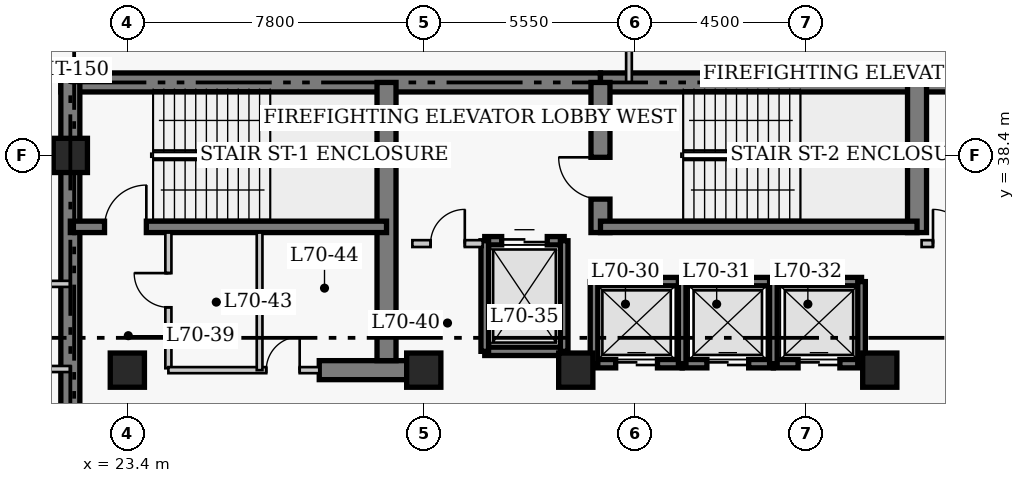
"""IFC4 building model, lengths in metres.
Left out: names, types, materials, properties, quantities, classifications, styles, units other than length and angle.
Written with IfcOpenShell. Run it as: python <this file> out.ifc"""

import sys

from ifc_helpers import new_model, si_unit, direction, frame, frame_2d, origin, origin_2d, place, context, subcontext, project, spatial, rectangle, extrude, element, fill, save


model = new_model("IFC4")
c1 = context("Model", 3, precision=1e-05, world=origin(), true_north=direction((0.0, 1.0)))
c2 = subcontext(c1, "Body", "Model", "MODEL_VIEW")
j1 = project(units=[si_unit("LENGTHUNIT", "METRE"), si_unit("PLANEANGLEUNIT", "RADIAN")], contexts=[c1])
p1 = place(None, origin())
s1 = spatial("IfcSite", under=j1, at=p1, CompositionType="ELEMENT")
p2 = place(p1, origin())
s2 = spatial("IfcBuilding", under=s1, at=p2, CompositionType="ELEMENT")
p3 = place(p2, frame((0.0, 0.0, 281.4)))
s3 = spatial("IfcBuildingStorey", under=s2, at=p3, CompositionType="ELEMENT", Elevation=281.4)
p4 = place(p3, frame((21.65, 40.32, 0.0), z_axis=(0.0, 0.0, 1.0), x_axis=(1.0, 0.0, 0.0)))
e1 = element("IfcWall", 1, at=p4, inside=s3, PredefinedType="SHEAR", context=c2, shape_type="SweptSolid", body=[
    extrude(rectangle(XDim=14.2, YDim=0.5, at=frame_2d((7.1, 0.0))), origin(), (0.0, 0.0, 1.0), 4.0),
])
p5 = place(p3, frame((35.85, 40.32, 0.0), z_axis=(0.0, 0.0, 1.0), x_axis=(1.0, 0.0, 0.0)))
e2 = element("IfcWall", 2, at=p5, inside=s3, PredefinedType="SHEAR", context=c2, shape_type="SweptSolid", body=[
    extrude(rectangle(XDim=12.6, YDim=0.5, at=frame_2d((6.3, 0.0))), origin(), (0.0, 0.0, 1.0), 4.0),
])
p6 = place(p3, frame((21.9, 27.05, 0.0), z_axis=(0.0, 0.0, 1.0), x_axis=(0.0, 1.0, 0.0)))
e3 = element("IfcWall", 3, at=p6, inside=s3, PredefinedType="SHEAR", context=c2, shape_type="SweptSolid", body=[
    extrude(rectangle(XDim=13.52, YDim=0.5, at=frame_2d((6.76, 0.0))), origin(), (0.0, 0.0, 1.0), 4.0),
])
p7 = place(p3, frame((28.45, 32.75, 0.0), z_axis=(0.0, 0.0, 1.0), x_axis=(1.0, 0.0, 0.0)))
e4 = element("IfcWall", 4, at=p7, inside=s3, PredefinedType="SHEAR", context=c2, shape_type="SweptSolid", body=[
    extrude(rectangle(XDim=2.4, YDim=0.5, at=frame_2d((1.2, 0.0))), origin(), (0.0, 0.0, 1.0), 4.0),
])
p8 = place(p3, frame((30.22, 33.0, 0.0), z_axis=(0.0, 0.0, 1.0), x_axis=(0.0, 1.0, 0.0)))
e5 = element("IfcWall", 5, at=p8, inside=s3, PredefinedType="SHEAR", context=c2, shape_type="SweptSolid", body=[
    extrude(rectangle(XDim=7.32, YDim=0.5, at=frame_2d((3.66, 0.0))), origin(), (0.0, 0.0, 1.0), 4.0),
])
p9 = place(p3, frame((35.85, 36.37, 0.0), z_axis=(0.0, 0.0, 1.0), x_axis=(0.0, 1.0, 0.0)))
e6 = element("IfcWall", 6, at=p9, inside=s3, PredefinedType="SHEAR", context=c2, shape_type="SweptSolid", body=[
    extrude(rectangle(XDim=3.95, YDim=0.5, at=frame_2d((1.975, 0.0))), origin(), (0.0, 0.0, 1.0), 4.0),
])
p10 = place(p9, frame((0.88, 0.0, 0.0)))
e7 = element("IfcOpeningElement", 7, at=p10, cuts=e6, PredefinedType="OPENING", context=c2, shape_type="SweptSolid", body=[
    extrude(rectangle(XDim=1.1, YDim=2.15, at=frame_2d((0.55, 1.075))), frame((0.0, 0.26, 0.0), z_axis=(0.0, -1.0, 0.0), x_axis=(1.0, 0.0, 0.0)), (0.0, 0.0, 1.0), 0.52),
])
p11 = place(p3, frame((44.18, 36.37, 0.0), z_axis=(0.0, 0.0, 1.0), x_axis=(0.0, 1.0, 0.0)))
e8 = element("IfcWall", 8, at=p11, inside=s3, PredefinedType="SHEAR", context=c2, shape_type="SweptSolid", body=[
    extrude(rectangle(XDim=3.95, YDim=0.5, at=frame_2d((1.975, 0.0))), origin(), (0.0, 0.0, 1.0), 4.0),
])
p12 = place(p3, frame((21.9, 36.52, 0.0), z_axis=(0.0, 0.0, 1.0), x_axis=(1.0, 0.0, 0.0)))
e9 = element("IfcWall", 9, at=p12, inside=s3, PredefinedType="SHEAR", context=c2, shape_type="SweptSolid", body=[
    extrude(rectangle(XDim=8.32, YDim=0.3, at=frame_2d((4.16, 0.0))), origin(), (0.0, 0.0, 1.0), 4.0),
])
p13 = place(p12, frame((0.9, 0.0, 0.0)))
e10 = element("IfcOpeningElement", 10, at=p13, cuts=e9, PredefinedType="OPENING", context=c2, shape_type="SweptSolid", body=[
    extrude(rectangle(XDim=1.1, YDim=2.15, at=frame_2d((0.55, 1.075))), frame((0.0, 0.16, 0.0), z_axis=(0.0, -1.0, 0.0), x_axis=(1.0, 0.0, 0.0)), (0.0, 0.0, 1.0), 0.32),
])
p14 = place(p3, frame((35.85, 36.52, 0.0), z_axis=(0.0, 0.0, 1.0), x_axis=(1.0, 0.0, 0.0)))
e11 = element("IfcWall", 11, at=p14, inside=s3, PredefinedType="SHEAR", context=c2, shape_type="SweptSolid", body=[
    extrude(rectangle(XDim=8.33, YDim=0.3, at=frame_2d((4.165, 0.0))), origin(), (0.0, 0.0, 1.0), 4.0),
])
for number, where, z_axis, x_axis in (
    (12, (21.9, 38.4, 0.0), (0.0, 0.0, 1.0), (1.0, 0.0, 0.0)),
    (13, (23.4, 32.75, 0.0), (0.0, 0.0, 1.0), (1.0, 0.0, 0.0)),
    (14, (31.2, 32.75, 0.0), (0.0, 0.0, 1.0), (1.0, 0.0, 0.0)),
    (15, (35.2, 32.75, 0.0), (0.0, 0.0, 1.0), (1.0, 0.0, 0.0)),
    (16, (43.2, 32.75, 0.0), (0.0, 0.0, 1.0), (1.0, 0.0, 0.0)),
):
    element("IfcColumn", number, at=place(p3, frame(where, z_axis=z_axis, x_axis=x_axis)), inside=s3, PredefinedType="COLUMN", context=c2, shape_type="SweptSolid", body=[
        extrude(rectangle(XDim=0.9, YDim=0.9, at=origin_2d()), origin(), (0.0, 0.0, 1.0), 4.0),
    ])
p15 = place(p3, frame((35.68, 35.08, 0.0), z_axis=(0.0, 0.0, 1.0), x_axis=(1.0, 0.0, 0.0)))
e17 = element("IfcWall", 17, at=p15, inside=s3, PredefinedType="SHEAR", context=c2, shape_type="SweptSolid", body=[
    extrude(rectangle(XDim=2.32, YDim=0.22, at=frame_2d((1.16, 0.0))), origin(), (0.0, 0.0, 1.0), 4.0),
])
p16 = place(p3, frame((35.68, 32.92, 0.0), z_axis=(0.0, 0.0, 1.0), x_axis=(1.0, 0.0, 0.0)))
e18 = element("IfcWall", 18, at=p16, inside=s3, PredefinedType="SHEAR", context=c2, shape_type="SweptSolid", body=[
    extrude(rectangle(XDim=2.32, YDim=0.22, at=frame_2d((1.16, 0.0))), origin(), (0.0, 0.0, 1.0), 4.0),
])
p17 = place(p16, frame((0.57, 0.0, 0.0)))
e19 = element("IfcOpeningElement", 19, at=p17, cuts=e18, PredefinedType="OPENING", context=c2, shape_type="SweptSolid", body=[
    extrude(rectangle(XDim=1.1, YDim=2.15, at=frame_2d((0.55, 1.075))), frame((0.0, 0.12, 0.0), z_axis=(0.0, -1.0, 0.0), x_axis=(1.0, 0.0, 0.0)), (0.0, 0.0, 1.0), 0.24),
])
p18 = place(p3, frame((35.68, 32.92, 0.0), z_axis=(0.0, 0.0, 1.0), x_axis=(0.0, 1.0, 0.0)))
e20 = element("IfcWall", 20, at=p18, inside=s3, PredefinedType="SHEAR", context=c2, shape_type="SweptSolid", body=[
    extrude(rectangle(XDim=2.16, YDim=0.2, at=frame_2d((1.08, 0.0))), origin(), (0.0, 0.0, 1.0), 4.0),
])
p19 = place(p3, frame((38.0, 35.08, 0.0), z_axis=(0.0, 0.0, 1.0), x_axis=(1.0, 0.0, 0.0)))
e21 = element("IfcWall", 21, at=p19, inside=s3, PredefinedType="SHEAR", context=c2, shape_type="SweptSolid", body=[
    extrude(rectangle(XDim=2.4, YDim=0.22, at=frame_2d((1.2, 0.0))), origin(), (0.0, 0.0, 1.0), 4.0),
])
p20 = place(p3, frame((38.0, 32.92, 0.0), z_axis=(0.0, 0.0, 1.0), x_axis=(1.0, 0.0, 0.0)))
e22 = element("IfcWall", 22, at=p20, inside=s3, PredefinedType="SHEAR", context=c2, shape_type="SweptSolid", body=[
    extrude(rectangle(XDim=2.4, YDim=0.22, at=frame_2d((1.2, 0.0))), origin(), (0.0, 0.0, 1.0), 4.0),
])
p21 = place(p20, frame((0.65, 0.0, 0.0)))
e23 = element("IfcOpeningElement", 23, at=p21, cuts=e22, PredefinedType="OPENING", context=c2, shape_type="SweptSolid", body=[
    extrude(rectangle(XDim=1.1, YDim=2.15, at=frame_2d((0.55, 1.075))), frame((0.0, 0.12, 0.0), z_axis=(0.0, -1.0, 0.0), x_axis=(1.0, 0.0, 0.0)), (0.0, 0.0, 1.0), 0.24),
])
p22 = place(p3, frame((38.0, 32.92, 0.0), z_axis=(0.0, 0.0, 1.0), x_axis=(0.0, 1.0, 0.0)))
e24 = element("IfcWall", 24, at=p22, inside=s3, PredefinedType="SHEAR", context=c2, shape_type="SweptSolid", body=[
    extrude(rectangle(XDim=2.16, YDim=0.2, at=frame_2d((1.08, 0.0))), origin(), (0.0, 0.0, 1.0), 4.0),
])
p23 = place(p3, frame((40.4, 35.08, 0.0), z_axis=(0.0, 0.0, 1.0), x_axis=(1.0, 0.0, 0.0)))
e25 = element("IfcWall", 25, at=p23, inside=s3, PredefinedType="SHEAR", context=c2, shape_type="SweptSolid", body=[
    extrude(rectangle(XDim=2.32, YDim=0.22, at=frame_2d((1.16, 0.0))), origin(), (0.0, 0.0, 1.0), 4.0),
])
p24 = place(p3, frame((40.4, 32.92, 0.0), z_axis=(0.0, 0.0, 1.0), x_axis=(1.0, 0.0, 0.0)))
e26 = element("IfcWall", 26, at=p24, inside=s3, PredefinedType="SHEAR", context=c2, shape_type="SweptSolid", body=[
    extrude(rectangle(XDim=2.32, YDim=0.22, at=frame_2d((1.16, 0.0))), origin(), (0.0, 0.0, 1.0), 4.0),
])
p25 = place(p24, frame((0.65, 0.0, 0.0)))
e27 = element("IfcOpeningElement", 27, at=p25, cuts=e26, PredefinedType="OPENING", context=c2, shape_type="SweptSolid", body=[
    extrude(rectangle(XDim=1.1, YDim=2.15, at=frame_2d((0.55, 1.075))), frame((0.0, 0.12, 0.0), z_axis=(0.0, -1.0, 0.0), x_axis=(1.0, 0.0, 0.0)), (0.0, 0.0, 1.0), 0.24),
])
for number, where, z_axis, x_axis in (
    (28, (40.4, 32.92, 0.0), (0.0, 0.0, 1.0), (0.0, 1.0, 0.0)),
    (29, (42.72, 32.92, 0.0), (0.0, 0.0, 1.0), (0.0, 1.0, 0.0)),
):
    element("IfcWall", number, at=place(p3, frame(where, z_axis=z_axis, x_axis=x_axis)), inside=s3, PredefinedType="SHEAR", context=c2, shape_type="SweptSolid", body=[
        extrude(rectangle(XDim=2.16, YDim=0.2, at=frame_2d((1.08, 0.0))), origin(), (0.0, 0.0, 1.0), 4.0),
    ])
p26 = place(p3, frame((32.805, 36.155, 0.0), z_axis=(0.0, 0.0, 1.0), x_axis=(1.0, 0.0, 0.0)))
e30 = element("IfcWall", 30, at=p26, inside=s3, PredefinedType="SHEAR", context=c2, shape_type="SweptSolid", body=[
    extrude(rectangle(XDim=2.09, YDim=0.22, at=frame_2d((1.045, 0.0))), origin(), (0.0, 0.0, 1.0), 4.0),
])
p27 = place(p26, frame((0.445, 0.0, 0.0)))
e31 = element("IfcOpeningElement", 31, at=p27, cuts=e30, PredefinedType="OPENING", context=c2, shape_type="SweptSolid", body=[
    extrude(rectangle(XDim=1.2, YDim=2.15, at=frame_2d((0.6, 1.075))), frame((0.0, 0.12, 0.0), z_axis=(0.0, -1.0, 0.0), x_axis=(1.0, 0.0, 0.0)), (0.0, 0.0, 1.0), 0.24),
])
p28 = place(p3, frame((32.805, 33.245, 0.0), z_axis=(0.0, 0.0, 1.0), x_axis=(1.0, 0.0, 0.0)))
e32 = element("IfcWall", 32, at=p28, inside=s3, PredefinedType="SHEAR", context=c2, shape_type="SweptSolid", body=[
    extrude(rectangle(XDim=2.09, YDim=0.22, at=frame_2d((1.045, 0.0))), origin(), (0.0, 0.0, 1.0), 4.0),
])
for number, where, z_axis, x_axis in (
    (33, (32.805, 33.245, 0.0), (0.0, 0.0, 1.0), (0.0, 1.0, 0.0)),
    (34, (34.895, 33.245, 0.0), (0.0, 0.0, 1.0), (0.0, 1.0, 0.0)),
):
    element("IfcWall", number, at=place(p3, frame(where, z_axis=z_axis, x_axis=x_axis)), inside=s3, PredefinedType="SHEAR", context=c2, shape_type="SweptSolid", body=[
        extrude(rectangle(XDim=2.91, YDim=0.2, at=frame_2d((1.455, 0.0))), origin(), (0.0, 0.0, 1.0), 4.0),
    ])
p29 = place(p3, frame((30.9, 36.08, 0.0), z_axis=(0.0, 0.0, 1.0), x_axis=(1.0, 0.0, 0.0)))
e35 = element("IfcWall", 35, at=p29, inside=s3, PredefinedType="PARTITIONING", context=c2, shape_type="SweptSolid", body=[
    extrude(rectangle(XDim=1.85, YDim=0.18, at=frame_2d((0.925, 0.0))), origin(), (0.0, 0.0, 1.0), 3.76),
])
p30 = place(p29, frame((0.48, 0.0, 0.0)))
e36 = element("IfcOpeningElement", 36, at=p30, cuts=e35, PredefinedType="OPENING", context=c2, shape_type="SweptSolid", body=[
    extrude(rectangle(XDim=0.9, YDim=2.15, at=frame_2d((0.45, 1.075))), frame((0.0, 0.1, 0.0), z_axis=(0.0, -1.0, 0.0), x_axis=(1.0, 0.0, 0.0)), (0.0, 0.0, 1.0), 0.2),
])
p31 = place(p3, frame((44.3, 36.08, 0.0), z_axis=(0.0, 0.0, 1.0), x_axis=(1.0, 0.0, 0.0)))
e37 = element("IfcWall", 37, at=p31, inside=s3, PredefinedType="PARTITIONING", context=c2, shape_type="SweptSolid", body=[
    extrude(rectangle(XDim=1.5, YDim=0.18, at=frame_2d((0.75, 0.0))), origin(), (0.0, 0.0, 1.0), 3.76),
])
p32 = place(p31, frame((0.3, 0.0, 0.0)))
e38 = element("IfcOpeningElement", 38, at=p32, cuts=e37, PredefinedType="OPENING", context=c2, shape_type="SweptSolid", body=[
    extrude(rectangle(XDim=0.9, YDim=2.15, at=frame_2d((0.45, 1.075))), frame((0.0, 0.1, 0.0), z_axis=(0.0, -1.0, 0.0), x_axis=(1.0, 0.0, 0.0)), (0.0, 0.0, 1.0), 0.2),
])
p33 = place(p3, frame((24.48, 32.8, 0.0), z_axis=(0.0, 0.0, 1.0), x_axis=(0.0, 1.0, 0.0)))
e39 = element("IfcWall", 39, at=p33, inside=s3, PredefinedType="PARTITIONING", context=c2, shape_type="SweptSolid", body=[
    extrude(rectangle(XDim=3.57, YDim=0.16, at=frame_2d((1.785, 0.0))), origin(), (0.0, 0.0, 1.0), 3.76),
])
p34 = place(p33, frame((1.604, 0.0, 0.0)))
e40 = element("IfcOpeningElement", 40, at=p34, cuts=e39, PredefinedType="OPENING", context=c2, shape_type="SweptSolid", body=[
    extrude(rectangle(XDim=0.9, YDim=2.1, at=frame_2d((0.45, 1.05))), frame((0.0, 0.09, 0.0), z_axis=(0.0, -1.0, 0.0), x_axis=(1.0, 0.0, 0.0)), (0.0, 0.0, 1.0), 0.18),
])
p35 = place(p3, frame((24.48, 32.75, 0.0), z_axis=(0.0, 0.0, 1.0), x_axis=(1.0, 0.0, 0.0)))
e41 = element("IfcWall", 41, at=p35, inside=s3, PredefinedType="PARTITIONING", context=c2, shape_type="SweptSolid", body=[
    extrude(rectangle(XDim=3.97, YDim=0.16, at=frame_2d((1.985, 0.0))), origin(), (0.0, 0.0, 1.0), 3.76),
])
p36 = place(p35, frame((2.575, 0.0, 0.0)))
e42 = element("IfcOpeningElement", 42, at=p36, cuts=e41, PredefinedType="OPENING", context=c2, shape_type="SweptSolid", body=[
    extrude(rectangle(XDim=0.88, YDim=2.05, at=frame_2d((0.44, 1.025))), frame((0.0, 0.09, 0.0), z_axis=(0.0, -1.0, 0.0), x_axis=(1.0, 0.0, 0.0)), (0.0, 0.0, 1.0), 0.18),
])
p37 = place(p3, frame((26.88, 32.75, 0.0), z_axis=(0.0, 0.0, 1.0), x_axis=(0.0, 1.0, 0.0)))
e43 = element("IfcWall", 43, at=p37, inside=s3, PredefinedType="PARTITIONING", context=c2, shape_type="SweptSolid", body=[
    extrude(rectangle(XDim=3.62, YDim=0.15, at=frame_2d((1.81, 0.0))), origin(), (0.0, 0.0, 1.0), 3.76),
])
for number, where, z_axis, x_axis in (
    (44, (18.86, 35.02, 0.0), (0.0, 0.0, 1.0), (1.0, 0.0, 0.0)),
    (45, (18.86, 32.78, 0.0), (0.0, 0.0, 1.0), (1.0, 0.0, 0.0)),
):
    element("IfcWall", number, at=place(p3, frame(where, z_axis=z_axis, x_axis=x_axis)), inside=s3, PredefinedType="PARTITIONING", context=c2, shape_type="SweptSolid", body=[
        extrude(rectangle(XDim=3.04, YDim=0.16, at=frame_2d((1.52, 0.0))), origin(), (0.0, 0.0, 1.0), 3.76),
    ])
p38 = place(p3, frame((16.64, 40.65, 0.0), z_axis=(0.0, 0.0, 1.0), x_axis=(1.0, 0.0, 0.0)))
e46 = element("IfcWall", 46, at=p38, inside=s3, PredefinedType="PARTITIONING", context=c2, shape_type="SweptSolid", body=[
    extrude(rectangle(XDim=5.46, YDim=0.15, at=frame_2d((2.73, 0.0))), origin(), (0.0, 0.0, 1.0), 3.76),
])
p39 = place(p38, frame((0.55, 0.0, 0.0)))
e47 = element("IfcOpeningElement", 47, at=p39, cuts=e46, PredefinedType="OPENING", context=c2, shape_type="SweptSolid", body=[
    extrude(rectangle(XDim=1.0, YDim=2.15, at=frame_2d((0.5, 1.075))), frame((0.0, 0.085, 0.0), z_axis=(0.0, -1.0, 0.0), x_axis=(1.0, 0.0, 0.0)), (0.0, 0.0, 1.0), 0.17),
])
p40 = place(p3, frame((36.6, 40.32, 0.0), z_axis=(0.0, 0.0, 1.0), x_axis=(0.0, 1.0, 0.0)))
e48 = element("IfcWall", 48, at=p40, inside=s3, PredefinedType="PARTITIONING", context=c2, shape_type="SweptSolid", body=[
    extrude(rectangle(XDim=3.545, YDim=0.15, at=frame_2d((1.772, 0.0))), origin(), (0.0, 0.0, 1.0), 3.76),
])
p41 = place(p17, origin())
e49 = element("IfcDoor", 49, at=p41, inside=s3, OperationType="DOUBLE_DOOR_SLIDING", PredefinedType="DOOR", context=c2, shape_type="SweptSolid", body=[
    extrude(rectangle(XDim=1.1, YDim=2.15, at=frame_2d((0.55, 1.075))), frame((0.0, 0.025, 0.0), z_axis=(0.0, -1.0, 0.0), x_axis=(1.0, 0.0, 0.0)), (0.0, 0.0, 1.0), 0.05),
])
fill(e19, e49)
p42 = place(p21, origin())
e50 = element("IfcDoor", 50, at=p42, inside=s3, OperationType="DOUBLE_DOOR_SLIDING", PredefinedType="DOOR", context=c2, shape_type="SweptSolid", body=[
    extrude(rectangle(XDim=1.1, YDim=2.15, at=frame_2d((0.55, 1.075))), frame((0.0, 0.025, 0.0), z_axis=(0.0, -1.0, 0.0), x_axis=(1.0, 0.0, 0.0)), (0.0, 0.0, 1.0), 0.05),
])
fill(e23, e50)
p43 = place(p25, origin())
e51 = element("IfcDoor", 51, at=p43, inside=s3, OperationType="DOUBLE_DOOR_SLIDING", PredefinedType="DOOR", context=c2, shape_type="SweptSolid", body=[
    extrude(rectangle(XDim=1.1, YDim=2.15, at=frame_2d((0.55, 1.075))), frame((0.0, 0.025, 0.0), z_axis=(0.0, -1.0, 0.0), x_axis=(1.0, 0.0, 0.0)), (0.0, 0.0, 1.0), 0.05),
])
fill(e27, e51)
p44 = place(p27, origin())
e52 = element("IfcDoor", 52, at=p44, inside=s3, OperationType="DOUBLE_DOOR_SLIDING", PredefinedType="DOOR", context=c2, shape_type="SweptSolid", body=[
    extrude(rectangle(XDim=1.2, YDim=2.15, at=frame_2d((0.6, 1.075))), frame((0.0, 0.025, 0.0), z_axis=(0.0, -1.0, 0.0), x_axis=(1.0, 0.0, 0.0)), (0.0, 0.0, 1.0), 0.05),
])
fill(e31, e52)
p45 = place(p30, origin())
e53 = element("IfcDoor", 53, at=p45, inside=s3, OperationType="SINGLE_SWING_RIGHT", PredefinedType="DOOR", context=c2, shape_type="SweptSolid", body=[
    extrude(rectangle(XDim=0.9, YDim=2.15, at=frame_2d((0.45, 1.075))), frame((0.0, 0.025, 0.0), z_axis=(0.0, -1.0, 0.0), x_axis=(1.0, 0.0, 0.0)), (0.0, 0.0, 1.0), 0.05),
])
fill(e36, e53)
p46 = place(p32, origin())
e54 = element("IfcDoor", 54, at=p46, inside=s3, OperationType="SINGLE_SWING_LEFT", PredefinedType="DOOR", context=c2, shape_type="SweptSolid", body=[
    extrude(rectangle(XDim=0.9, YDim=2.15, at=frame_2d((0.45, 1.075))), frame((0.0, 0.025, 0.0), z_axis=(0.0, -1.0, 0.0), x_axis=(1.0, 0.0, 0.0)), (0.0, 0.0, 1.0), 0.05),
])
fill(e38, e54)
p47 = place(p34, origin())
e55 = element("IfcDoor", 55, at=p47, inside=s3, OperationType="SINGLE_SWING_RIGHT", PredefinedType="DOOR", context=c2, shape_type="SweptSolid", body=[
    extrude(rectangle(XDim=0.9, YDim=2.1, at=frame_2d((0.45, 1.05))), frame((0.0, 0.025, 0.0), z_axis=(0.0, -1.0, 0.0), x_axis=(1.0, 0.0, 0.0)), (0.0, 0.0, 1.0), 0.05),
])
fill(e40, e55)
p48 = place(p36, origin())
e56 = element("IfcDoor", 56, at=p48, inside=s3, OperationType="SINGLE_SWING_RIGHT", PredefinedType="DOOR", context=c2, shape_type="SweptSolid", body=[
    extrude(rectangle(XDim=0.88, YDim=2.05, at=frame_2d((0.44, 1.025))), frame((0.0, 0.025, 0.0), z_axis=(0.0, -1.0, 0.0), x_axis=(1.0, 0.0, 0.0)), (0.0, 0.0, 1.0), 0.05),
])
fill(e42, e56)
p49 = place(p13, origin())
e57 = element("IfcDoor", 57, at=p49, inside=s3, OperationType="SINGLE_SWING_RIGHT", PredefinedType="DOOR", context=c2, shape_type="SweptSolid", body=[
    extrude(rectangle(XDim=1.1, YDim=2.15, at=frame_2d((0.55, 1.075))), frame((0.0, 0.025, 0.0), z_axis=(0.0, -1.0, 0.0), x_axis=(1.0, 0.0, 0.0)), (0.0, 0.0, 1.0), 0.05),
])
fill(e10, e57)
p50 = place(p10, origin())
e58 = element("IfcDoor", 58, at=p50, inside=s3, OperationType="SINGLE_SWING_RIGHT", PredefinedType="DOOR", context=c2, shape_type="SweptSolid", body=[
    extrude(rectangle(XDim=1.1, YDim=2.15, at=frame_2d((0.55, 1.075))), frame((0.0, 0.025, 0.0), z_axis=(0.0, -1.0, 0.0), x_axis=(1.0, 0.0, 0.0)), (0.0, 0.0, 1.0), 0.05),
])
fill(e7, e58)
save(model, sys.argv[1])
